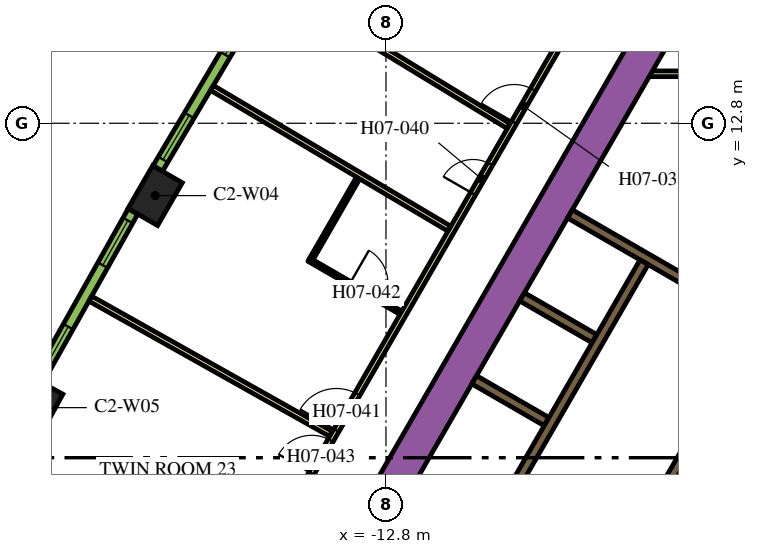
"""IFC4 building model, lengths in metres.
Left out: names, types, materials, properties, quantities, classifications, styles, units other than length and angle.
Written with IfcOpenShell. Run it as: python <this file> out.ifc"""

import sys

from ifc_helpers import new_model, si_unit, direction, frame, frame_2d, origin, origin_2d, place, context, subcontext, project, spatial, rectangle, extrude, element, fill, save


model = new_model("IFC4")
c1 = context("Model", 3, precision=1e-05, world=origin(), true_north=direction((0.0, 1.0)))
c2 = subcontext(c1, "Body", "Model", "MODEL_VIEW")
j1 = project(units=[si_unit("LENGTHUNIT", "METRE"), si_unit("PLANEANGLEUNIT", "RADIAN")], contexts=[c1])
p1 = place(None, origin())
s1 = spatial("IfcSite", under=j1, at=p1, CompositionType="ELEMENT")
p2 = place(p1, origin())
s2 = spatial("IfcBuilding", under=s1, at=p2, CompositionType="ELEMENT")
p3 = place(p2, frame((0.0, 0.0, 95.4)))
s3 = spatial("IfcBuildingStorey", under=s2, at=p3, CompositionType="ELEMENT", Elevation=95.4)
for number, where, z_axis, x_axis in (
    (1, (-18.874, 10.897, 0.0), (0.0, 0.0, 1.0), (-0.5, -0.866, 0.0)),
    (2, (-22.009, 5.317, 0.0), (0.0, 0.0, 1.0), (-0.48, -0.877, 0.0)),
):
    element("IfcColumn", number, at=place(p3, frame(where, z_axis=z_axis, x_axis=x_axis)), inside=s3, PredefinedType="COLUMN", context=c2, shape_type="SweptSolid", body=[
        extrude(rectangle(XDim=1.3, YDim=0.9, at=origin_2d()), origin(), (0.0, 0.0, 1.0), 3.9),
    ])
p4 = place(p3, frame((-15.36, -1.503, 0.0), z_axis=(0.0, 0.0, 1.0), x_axis=(0.50000389221, 0.866023156604, 0.0)))
e3 = element("IfcWall", 3, at=p4, inside=s3, PredefinedType="SOLIDWALL", context=c2, shape_type="SweptSolid", body=[
    extrude(rectangle(XDim=21.0, YDim=0.9, at=frame_2d((10.5, 0.0))), origin(), (0.0, 0.0, 1.0), 3.9),
])
p5 = place(p3, frame((-8.06, -1.311, 0.0), z_axis=(0.0, 0.0, 1.0), x_axis=(0.50000273126, 0.866023826885, 0.0)))
e4 = element("IfcWall", 4, at=p5, inside=s3, PredefinedType="SOLIDWALL", context=c2, shape_type="SweptSolid", body=[
    extrude(rectangle(XDim=10.33, YDim=0.25, at=frame_2d((5.165, 0.0))), origin(), (0.0, 0.0, 1.0), 3.9),
])
for number, where, z_axis, x_axis in (
    (5, (-8.574, 4.95, 0.0), (0.0, 0.0, 1.0), (-0.866, 0.5, 0.0)),
    (6, (-7.314, 7.132, 0.0), (0.0, 0.0, 1.0), (-0.866, 0.5, 0.0)),
):
    element("IfcWall", number, at=place(p3, frame(where, z_axis=z_axis, x_axis=x_axis)), inside=s3, PredefinedType="SOLIDWALL", context=c2, shape_type="SweptSolid", body=[
        extrude(rectangle(XDim=2.2, YDim=0.25, at=frame_2d((1.1, 0.0))), origin(), (0.0, 0.0, 1.0), 3.9),
    ])
p6 = place(p3, frame((-7.959, 10.415, 0.0), z_axis=(0.0, 0.0, 1.0), x_axis=(0.866020958405, -0.500007699544, 0.0)))
e7 = element("IfcWall", 7, at=p6, inside=s3, PredefinedType="SOLIDWALL", context=c2, shape_type="SweptSolid", body=[
    extrude(rectangle(XDim=4.1, YDim=0.25, at=frame_2d((2.05, 0.0))), origin(), (0.0, 0.0, 1.0), 3.9),
])
p7 = place(p3, frame((-5.851, 14.102, 0.0), z_axis=(0.0, 0.0, 1.0), x_axis=(1.0, 0.0, 0.0)))
e8 = element("IfcWall", 8, at=p7, inside=s3, PredefinedType="PARTITIONING", context=c2, shape_type="SweptSolid", body=[
    extrude(rectangle(XDim=1.18, YDim=0.15, at=frame_2d((0.59, 0.0))), origin(), (0.0, 0.0, 1.0), 2.75),
])
p8 = place(p3, frame((-6.008, 9.144, 0.0), z_axis=(0.0, 0.0, 1.0), x_axis=(-0.500006956611, -0.866021387346, 0.0)))
e9 = element("IfcWall", 9, at=p8, inside=s3, PredefinedType="SOLIDWALL", context=c2, shape_type="SweptSolid", body=[
    extrude(rectangle(XDim=9.83, YDim=0.25, at=frame_2d((4.915, 0.0))), origin(), (0.0, 0.0, 1.0), 3.9),
])
p9 = place(p8, frame((6.985, 0.0, 0.0)))
e10 = element("IfcOpeningElement", 10, at=p9, cuts=e9, PredefinedType="OPENING", context=c2, shape_type="SweptSolid", body=[
    extrude(rectangle(XDim=0.9, YDim=2.1, at=frame_2d((0.45, 1.05))), frame((0.0, 0.135, 0.0), z_axis=(0.0, -1.0, 0.0), x_axis=(1.0, 0.0, 0.0)), (0.0, 0.0, 1.0), 0.27),
])
p10 = place(p3, frame((-0.898, 6.194, 0.0), z_axis=(0.0, 0.0, 1.0), x_axis=(-0.499996202215, -0.866027596426, 0.0)))
e11 = element("IfcWall", 11, at=p10, inside=s3, PredefinedType="SOLIDWALL", context=c2, shape_type="SweptSolid", body=[
    extrude(rectangle(XDim=9.83, YDim=0.25, at=frame_2d((4.915, 0.0))), origin(), (0.0, 0.0, 1.0), 3.9),
])
p11 = place(p10, frame((0.585, 0.0, 0.0)))
e12 = element("IfcOpeningElement", 12, at=p11, cuts=e11, PredefinedType="OPENING", context=c2, shape_type="SweptSolid", body=[
    extrude(rectangle(XDim=1.1, YDim=2.1, at=frame_2d((0.55, 1.05))), frame((0.0, 0.135, 0.0), z_axis=(0.0, -1.0, 0.0), x_axis=(1.0, 0.0, 0.0)), (0.0, 0.0, 1.0), 0.27),
])
p12 = place(p10, frame((3.105, 0.0, 0.0)))
e13 = element("IfcOpeningElement", 13, at=p12, cuts=e11, PredefinedType="OPENING", context=c2, shape_type="SweptSolid", body=[
    extrude(rectangle(XDim=1.1, YDim=2.1, at=frame_2d((0.55, 1.05))), frame((0.0, 0.135, 0.0), z_axis=(0.0, -1.0, 0.0), x_axis=(1.0, 0.0, 0.0)), (0.0, 0.0, 1.0), 0.27),
])
p13 = place(p10, frame((5.625, 0.0, 0.0)))
e14 = element("IfcOpeningElement", 14, at=p13, cuts=e11, PredefinedType="OPENING", context=c2, shape_type="SweptSolid", body=[
    extrude(rectangle(XDim=1.1, YDim=2.1, at=frame_2d((0.55, 1.05))), frame((0.0, 0.135, 0.0), z_axis=(0.0, -1.0, 0.0), x_axis=(1.0, 0.0, 0.0)), (0.0, 0.0, 1.0), 0.27),
])
p14 = place(p10, frame((8.145, 0.0, 0.0)))
e15 = element("IfcOpeningElement", 15, at=p14, cuts=e11, PredefinedType="OPENING", context=c2, shape_type="SweptSolid", body=[
    extrude(rectangle(XDim=1.1, YDim=2.1, at=frame_2d((0.55, 1.05))), frame((0.0, 0.135, 0.0), z_axis=(0.0, -1.0, 0.0), x_axis=(1.0, 0.0, 0.0)), (0.0, 0.0, 1.0), 0.27),
])
p15 = place(p3, frame((-19.081, -3.9, 0.0), z_axis=(0.0, 0.0, 1.0), x_axis=(0.499998313975, 0.866026377209, 0.0)))
e16 = element("IfcWall", 16, at=p15, inside=s3, PredefinedType="PARTITIONING", context=c2, shape_type="SweptSolid", body=[
    extrude(rectangle(XDim=25.766, YDim=0.15, at=frame_2d((12.883, 0.0))), origin(), (0.0, 0.0, 1.0), 2.75),
])
p16 = place(p15, frame((19.306, 0.0, 0.0)))
e17 = element("IfcOpeningElement", 17, at=p16, cuts=e16, PredefinedType="OPENING", context=c2, shape_type="SweptSolid", body=[
    extrude(rectangle(XDim=1.0, YDim=2.1, at=frame_2d((0.5, 1.05))), frame((0.0, 0.085, 0.0), z_axis=(0.0, -1.0, 0.0), x_axis=(1.0, 0.0, 0.0)), (0.0, 0.0, 1.0), 0.17),
])
p17 = place(p15, frame((17.144, 0.0, 0.0)))
e18 = element("IfcOpeningElement", 18, at=p17, cuts=e16, PredefinedType="OPENING", context=c2, shape_type="SweptSolid", body=[
    extrude(rectangle(XDim=0.9, YDim=2.1, at=frame_2d((0.45, 1.05))), frame((0.0, 0.085, 0.0), z_axis=(0.0, -1.0, 0.0), x_axis=(1.0, 0.0, 0.0)), (0.0, 0.0, 1.0), 0.17),
])
p18 = place(p15, frame((9.955, 0.0, 0.0)))
e19 = element("IfcOpeningElement", 19, at=p18, cuts=e16, PredefinedType="OPENING", context=c2, shape_type="SweptSolid", body=[
    extrude(rectangle(XDim=1.1, YDim=2.1, at=frame_2d((0.55, 1.05))), frame((0.0, 0.085, 0.0), z_axis=(0.0, -1.0, 0.0), x_axis=(1.0, 0.0, 0.0)), (0.0, 0.0, 1.0), 0.17),
])
p19 = place(p15, frame((8.648, 0.0, 0.0)))
e20 = element("IfcOpeningElement", 20, at=p19, cuts=e16, PredefinedType="OPENING", context=c2, shape_type="SweptSolid", body=[
    extrude(rectangle(XDim=1.0, YDim=2.1, at=frame_2d((0.5, 1.05))), frame((0.0, 0.085, 0.0), z_axis=(0.0, -1.0, 0.0), x_axis=(1.0, 0.0, 0.0)), (0.0, 0.0, 1.0), 0.17),
])
p20 = place(p15, frame((1.553, 0.0, 0.0)))
e21 = element("IfcOpeningElement", 21, at=p20, cuts=e16, PredefinedType="OPENING", context=c2, shape_type="SweptSolid", body=[
    extrude(rectangle(XDim=0.9, YDim=2.1, at=frame_2d((0.45, 1.05))), frame((0.0, 0.085, 0.0), z_axis=(0.0, -1.0, 0.0), x_axis=(1.0, 0.0, 0.0)), (0.0, 0.0, 1.0), 0.17),
])
for number, where, z_axis, x_axis in (
    (22, (-20.581, 8.185, 0.0), (0.0, 0.0, 1.0), (0.872, -0.49, 0.0)),
    (23, (-17.379, 13.731, 0.0), (0.0, 0.0, 1.0), (0.86, -0.51, 0.0)),
):
    element("IfcWall", number, at=place(p3, frame(where, z_axis=z_axis, x_axis=x_axis)), inside=s3, PredefinedType="PARTITIONING", context=c2, shape_type="SweptSolid", body=[
        extrude(rectangle(XDim=7.257, YDim=0.15, at=frame_2d((3.628, 0.0))), origin(), (0.0, 0.0, 1.0), 2.75),
    ])
p21 = place(p3, frame((-15.225, 16.167, 0.0), z_axis=(0.0, 0.0, 1.0), x_axis=(0.854088713274, -0.520127359266, 0.0)))
e24 = element("IfcWall", 24, at=p21, inside=s3, PredefinedType="PARTITIONING", context=c2, shape_type="SweptSolid", body=[
    extrude(rectangle(XDim=6.611, YDim=0.15, at=frame_2d((3.305, 0.0))), origin(), (0.0, 0.0, 1.0), 2.75),
])
p22 = place(p3, frame((-14.83, 9.213, 0.0), z_axis=(0.0, 0.0, 1.0), x_axis=(0.866034573852, -0.49998411664, 0.0)))
e25 = element("IfcWall", 25, at=p22, inside=s3, PredefinedType="PARTITIONING", context=c2, shape_type="SweptSolid", body=[
    extrude(rectangle(XDim=2.8, YDim=0.1, at=frame_2d((1.4, 0.0))), origin(), (0.0, 0.0, 1.0), 2.75),
])
p23 = place(p22, frame((1.25, 0.0, 0.0)))
e26 = element("IfcOpeningElement", 26, at=p23, cuts=e25, PredefinedType="OPENING", context=c2, shape_type="SweptSolid", body=[
    extrude(rectangle(XDim=1.0, YDim=2.1, at=frame_2d((0.5, 1.05))), frame((0.0, 0.06, 0.0), z_axis=(0.0, -1.0, 0.0), x_axis=(1.0, 0.0, 0.0)), (0.0, 0.0, 1.0), 0.12),
])
p24 = place(p3, frame((-14.762, 9.231, 0.0), z_axis=(0.0, 0.0, 1.0), x_axis=(0.500003092839, 0.866023618125, 0.0)))
e27 = element("IfcWall", 27, at=p24, inside=s3, PredefinedType="PARTITIONING", context=c2, shape_type="SweptSolid", body=[
    extrude(rectangle(XDim=2.46, YDim=0.1, at=frame_2d((1.23, 0.0))), origin(), (0.0, 0.0, 1.0), 2.75),
])
p25 = place(p3, frame((-16.203, 15.998, 0.0), z_axis=(0.0, 0.0, 1.0), x_axis=(-0.510054281659, -0.860142214847, 0.0)))
e28 = element("IfcWall", 28, at=p25, inside=s3, PredefinedType="SOLIDWALL", context=c2, shape_type="SweptSolid", body=[
    extrude(rectangle(XDim=5.101, YDim=0.29, at=frame_2d((2.55, 0.0))), origin(), (0.0, 0.0, 1.0), 3.65),
])
p26 = place(p25, frame((0.273, 0.0, 0.9)))
e29 = element("IfcOpeningElement", 29, at=p26, cuts=e28, PredefinedType="OPENING", context=c2, shape_type="SweptSolid", body=[
    extrude(rectangle(XDim=1.35, YDim=2.15, at=frame_2d((0.675, 1.075))), frame((0.0, 0.155, 0.0), z_axis=(0.0, -1.0, 0.0), x_axis=(1.0, 0.0, 0.0)), (0.0, 0.0, 1.0), 0.31),
])
p27 = place(p25, frame((3.478, 0.0, 0.9)))
e30 = element("IfcOpeningElement", 30, at=p27, cuts=e28, PredefinedType="OPENING", context=c2, shape_type="SweptSolid", body=[
    extrude(rectangle(XDim=1.35, YDim=2.15, at=frame_2d((0.675, 1.075))), frame((0.0, 0.155, 0.0), z_axis=(0.0, -1.0, 0.0), x_axis=(1.0, 0.0, 0.0)), (0.0, 0.0, 1.0), 0.31),
])
p28 = place(p3, frame((-19.458, 10.48, 0.0), z_axis=(0.0, 0.0, 1.0), x_axis=(-0.48983164787, -0.87181704316, 0.0)))
e31 = element("IfcWall", 31, at=p28, inside=s3, PredefinedType="SOLIDWALL", context=c2, shape_type="SweptSolid", body=[
    extrude(rectangle(XDim=5.1, YDim=0.29, at=frame_2d((2.55, 0.0))), origin(), (0.0, 0.0, 1.0), 3.65),
])
p29 = place(p28, frame((0.272, 0.0, 0.9)))
e32 = element("IfcOpeningElement", 32, at=p29, cuts=e31, PredefinedType="OPENING", context=c2, shape_type="SweptSolid", body=[
    extrude(rectangle(XDim=1.35, YDim=2.15, at=frame_2d((0.675, 1.075))), frame((0.0, 0.155, 0.0), z_axis=(0.0, -1.0, 0.0), x_axis=(1.0, 0.0, 0.0)), (0.0, 0.0, 1.0), 0.31),
])
p30 = place(p28, frame((3.478, 0.0, 0.9)))
e33 = element("IfcOpeningElement", 33, at=p30, cuts=e31, PredefinedType="OPENING", context=c2, shape_type="SweptSolid", body=[
    extrude(rectangle(XDim=1.35, YDim=2.15, at=frame_2d((0.675, 1.075))), frame((0.0, 0.155, 0.0), z_axis=(0.0, -1.0, 0.0), x_axis=(1.0, 0.0, 0.0)), (0.0, 0.0, 1.0), 0.31),
])
p31 = place(p16, origin())
e34 = element("IfcDoor", 34, at=p31, inside=s3, OperationType="SINGLE_SWING_LEFT", PredefinedType="DOOR", context=c2, shape_type="SweptSolid", body=[
    extrude(rectangle(XDim=1.0, YDim=2.1, at=frame_2d((0.5, 1.05))), frame((0.0, 0.025, 0.0), z_axis=(0.0, -1.0, 0.0), x_axis=(1.0, 0.0, 0.0)), (0.0, 0.0, 1.0), 0.05),
])
fill(e17, e34)
p32 = place(p17, origin())
e35 = element("IfcDoor", 35, at=p32, inside=s3, OperationType="SINGLE_SWING_LEFT", PredefinedType="DOOR", context=c2, shape_type="SweptSolid", body=[
    extrude(rectangle(XDim=0.9, YDim=2.1, at=frame_2d((0.45, 1.05))), frame((0.0, 0.025, 0.0), z_axis=(0.0, -1.0, 0.0), x_axis=(1.0, 0.0, 0.0)), (0.0, 0.0, 1.0), 0.05),
])
fill(e18, e35)
p33 = place(p18, origin())
e36 = element("IfcDoor", 36, at=p33, inside=s3, OperationType="SINGLE_SWING_LEFT", PredefinedType="DOOR", context=c2, shape_type="SweptSolid", body=[
    extrude(rectangle(XDim=1.1, YDim=2.1, at=frame_2d((0.55, 1.05))), frame((0.0, 0.025, 0.0), z_axis=(0.0, -1.0, 0.0), x_axis=(1.0, 0.0, 0.0)), (0.0, 0.0, 1.0), 0.05),
])
fill(e19, e36)
p34 = place(p23, origin())
e37 = element("IfcDoor", 37, at=p34, inside=s3, OperationType="SINGLE_SWING_LEFT", PredefinedType="DOOR", context=c2, shape_type="SweptSolid", body=[
    extrude(rectangle(XDim=1.0, YDim=2.1, at=frame_2d((0.5, 1.05))), frame((0.0, 0.025, 0.0), z_axis=(0.0, -1.0, 0.0), x_axis=(1.0, 0.0, 0.0)), (0.0, 0.0, 1.0), 0.05),
])
fill(e26, e37)
p35 = place(p19, origin())
e38 = element("IfcDoor", 38, at=p35, inside=s3, OperationType="SINGLE_SWING_RIGHT", PredefinedType="DOOR", context=c2, shape_type="SweptSolid", body=[
    extrude(rectangle(XDim=1.0, YDim=2.1, at=frame_2d((0.5, 1.05))), frame((0.0, 0.025, 0.0), z_axis=(0.0, -1.0, 0.0), x_axis=(1.0, 0.0, 0.0)), (0.0, 0.0, 1.0), 0.05),
])
fill(e20, e38)
p36 = place(p26, origin())
e39 = element("IfcWindow", 39, at=p36, inside=s3, PartitioningType="DOUBLE_PANEL_VERTICAL", PredefinedType="WINDOW", context=c2, shape_type="SweptSolid", body=[
    extrude(rectangle(XDim=1.35, YDim=2.15, at=frame_2d((0.675, 1.075))), frame((0.0, 0.015, 0.0), z_axis=(0.0, -1.0, 0.0), x_axis=(1.0, 0.0, 0.0)), (0.0, 0.0, 1.0), 0.06),
])
fill(e29, e39)
p37 = place(p27, origin())
e40 = element("IfcWindow", 40, at=p37, inside=s3, PartitioningType="DOUBLE_PANEL_VERTICAL", PredefinedType="WINDOW", context=c2, shape_type="SweptSolid", body=[
    extrude(rectangle(XDim=1.35, YDim=2.15, at=frame_2d((0.675, 1.075))), frame((0.0, 0.015, 0.0), z_axis=(0.0, -1.0, 0.0), x_axis=(1.0, 0.0, 0.0)), (0.0, 0.0, 1.0), 0.06),
])
fill(e30, e40)
p38 = place(p29, origin())
e41 = element("IfcWindow", 41, at=p38, inside=s3, PartitioningType="DOUBLE_PANEL_VERTICAL", PredefinedType="WINDOW", context=c2, shape_type="SweptSolid", body=[
    extrude(rectangle(XDim=1.35, YDim=2.15, at=frame_2d((0.675, 1.075))), frame((0.0, 0.015, 0.0), z_axis=(0.0, -1.0, 0.0), x_axis=(1.0, 0.0, 0.0)), (0.0, 0.0, 1.0), 0.06),
])
fill(e32, e41)
p39 = place(p30, origin())
e42 = element("IfcWindow", 42, at=p39, inside=s3, PartitioningType="DOUBLE_PANEL_VERTICAL", PredefinedType="WINDOW", context=c2, shape_type="SweptSolid", body=[
    extrude(rectangle(XDim=1.35, YDim=2.15, at=frame_2d((0.675, 1.075))), frame((0.0, 0.015, 0.0), z_axis=(0.0, -1.0, 0.0), x_axis=(1.0, 0.0, 0.0)), (0.0, 0.0, 1.0), 0.06),
])
fill(e33, e42)
save(model, sys.argv[1])
